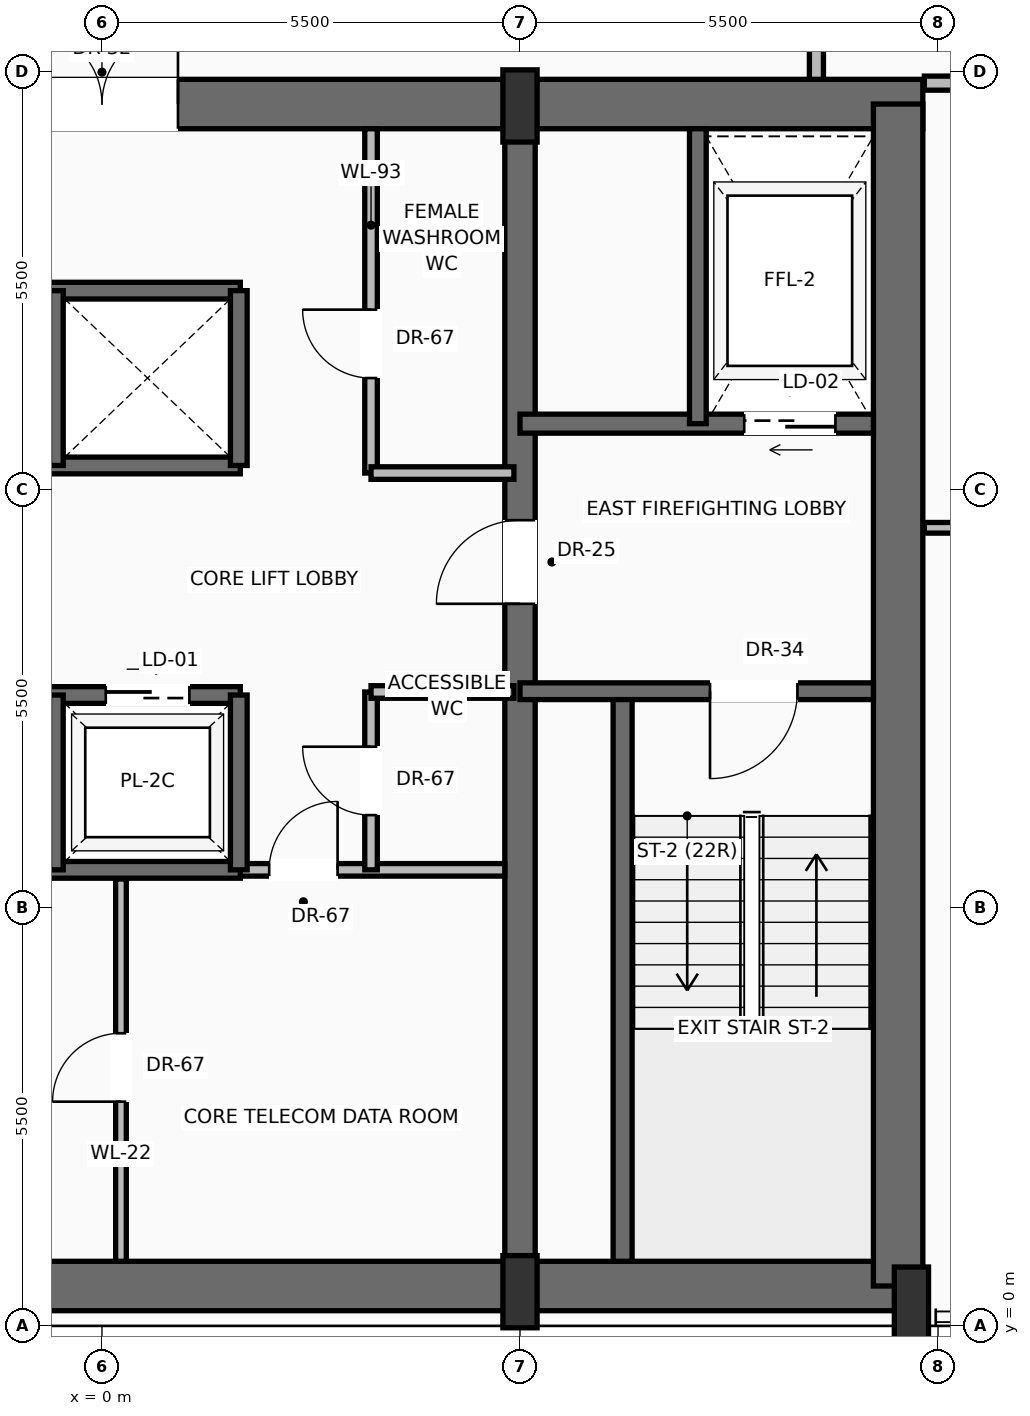
"""IFC4 building model, lengths in metres.
Left out: names, types, materials, properties, quantities, classifications, styles, units other than length and angle.
Written with IfcOpenShell. Run it as: python <this file> out.ifc"""

import sys

from ifc_helpers import new_model, si_unit, direction, frame, frame_2d, origin, origin_2d, place, context, subcontext, project, spatial, rectangle, extrude, source, transform, mapped, element, fill, save


model = new_model("IFC4")
c1 = context("Model", 3, precision=1e-05, world=origin(), true_north=direction((0.0, 1.0)))
c2 = subcontext(c1, "Body", "Model", "MODEL_VIEW")
j1 = project(units=[si_unit("LENGTHUNIT", "METRE"), si_unit("PLANEANGLEUNIT", "RADIAN")], contexts=[c1])
p1 = place(None, origin())
s1 = spatial("IfcSite", under=j1, at=p1, CompositionType="ELEMENT")
p2 = place(p1, origin())
s2 = spatial("IfcBuilding", under=s1, at=p2, CompositionType="ELEMENT")
p3 = place(p2, frame((0.0, 0.0, 155.2)))
s3 = spatial("IfcBuildingStorey", under=s2, at=p3, CompositionType="ELEMENT", Elevation=155.2)
p4 = place(p3, frame((-10.65, 0.525, 0.0), z_axis=(0.0, 0.0, 1.0), x_axis=(1.0, 0.0, 0.0)))
e1 = element("IfcWall", 1, at=p4, inside=s3, PredefinedType="SHEAR", context=c2, shape_type="SweptSolid", body=[
    extrude(rectangle(XDim=21.3, YDim=0.65, at=frame_2d((10.65, 0.0))), origin(), (0.0, 0.0, 1.0), 3.47),
])
p5 = place(p3, frame((-10.8, 16.075, 0.0), z_axis=(0.0, 0.0, 1.0), x_axis=(1.0, 0.0, 0.0)))
e2 = element("IfcWall", 2, at=p5, inside=s3, PredefinedType="SHEAR", context=c2, shape_type="SweptSolid", body=[
    extrude(rectangle(XDim=21.6, YDim=0.65, at=frame_2d((10.8, 0.0))), origin(), (0.0, 0.0, 1.0), 3.47),
])
p6 = place(p5, frame((3.37, 0.0, 0.0)))
e3 = element("IfcOpeningElement", 3, at=p6, cuts=e2, PredefinedType="OPENING", context=c2, shape_type="SweptSolid", body=[
    extrude(rectangle(XDim=1.3, YDim=2.3, at=frame_2d((0.65, 1.15))), frame((0.0, 0.335, 0.0), z_axis=(0.0, -1.0, 0.0), x_axis=(1.0, 0.0, 0.0)), (0.0, 0.0, 1.0), 0.67),
])
p7 = place(p5, frame((9.8, 0.0, 0.0)))
e4 = element("IfcOpeningElement", 4, at=p7, cuts=e2, PredefinedType="OPENING", context=c2, shape_type="SweptSolid", body=[
    extrude(rectangle(XDim=2.0, YDim=2.4, at=frame_2d((1.0, 1.2))), frame((0.0, 0.335, 0.0), z_axis=(0.0, -1.0, 0.0), x_axis=(1.0, 0.0, 0.0)), (0.0, 0.0, 1.0), 0.67),
])
p8 = place(p3, frame((10.475, 0.525, 0.0), z_axis=(0.0, 0.0, 1.0), x_axis=(0.0, 1.0, 0.0)))
e5 = element("IfcWall", 5, at=p8, inside=s3, PredefinedType="SHEAR", context=c2, shape_type="SweptSolid", body=[
    extrude(rectangle(XDim=15.55, YDim=0.65, at=frame_2d((7.775, 0.0))), origin(), (0.0, 0.0, 1.0), 3.47),
])
p9 = place(p3, frame((5.5, 0.525, 0.0), z_axis=(0.0, 0.0, 1.0), x_axis=(0.0, 1.0, 0.0)))
e6 = element("IfcWall", 6, at=p9, inside=s3, PredefinedType="SHEAR", context=c2, shape_type="SweptSolid", body=[
    extrude(rectangle(XDim=15.55, YDim=0.4, at=frame_2d((7.775, 0.0))), origin(), (0.0, 0.0, 1.0), 3.47),
])
p10 = place(p9, frame((8.975, 0.0, 0.0)))
e7 = element("IfcOpeningElement", 7, at=p10, cuts=e6, PredefinedType="OPENING", context=c2, shape_type="SweptSolid", body=[
    extrude(rectangle(XDim=1.1, YDim=2.2, at=frame_2d((0.55, 1.1))), frame((0.0, 0.21, 0.0), z_axis=(0.0, -1.0, 0.0), x_axis=(1.0, 0.0, 0.0)), (0.0, 0.0, 1.0), 0.42),
])
m1 = source(origin(), c2, "Body", "SweptSolid", [
    extrude(rectangle(XDim=0.45, YDim=0.95, at=origin_2d()), origin(), (0.0, 0.0, 1.0), 3.7),
])
for number, where, z_axis, x_axis in (
    (8, (5.5, 0.45, 0.0), (0.0, 0.0, 1.0), (1.0, 0.0, 0.0)),
    (9, (10.65, 0.3, 0.0), (0.0, 0.0, 1.0), (1.0, 0.0, 0.0)),
    (10, (5.5, 16.05, 0.0), (0.0, 0.0, 1.0), (1.0, 0.0, 0.0)),
):
    element("IfcColumn", number, at=place(p3, frame(where, z_axis=z_axis, x_axis=x_axis)), inside=s3, PredefinedType="PILASTER", context=c2, shape_type="MappedRepresentation", body=[
        mapped(m1, transform((0.0, 0.0, 0.0), scale=1.0)),
    ])
p11 = place(p3, frame((6.85, 0.85, 0.0), z_axis=(0.0, 0.0, 1.0), x_axis=(0.0, 1.0, 0.0)))
e11 = element("IfcWall", 11, at=p11, inside=s3, PredefinedType="SOLIDWALL", context=c2, shape_type="SweptSolid", body=[
    extrude(rectangle(XDim=7.5, YDim=0.25, at=frame_2d((3.75, 0.0))), origin(), (0.0, 0.0, 1.0), 3.47),
])
p12 = place(p3, frame((10.15, 8.35, 0.0), z_axis=(0.0, 0.0, 1.0), x_axis=(-1.0, 0.0, 0.0)))
e12 = element("IfcWall", 12, at=p12, inside=s3, PredefinedType="SOLIDWALL", context=c2, shape_type="SweptSolid", body=[
    extrude(rectangle(XDim=4.65, YDim=0.22, at=frame_2d((2.325, 0.0))), origin(), (0.0, 0.0, 1.0), 3.47),
])
p13 = place(p12, frame((1.0, 0.0, 0.0)))
e13 = element("IfcOpeningElement", 13, at=p13, cuts=e12, PredefinedType="OPENING", context=c2, shape_type="SweptSolid", body=[
    extrude(rectangle(XDim=1.15, YDim=2.2, at=frame_2d((0.575, 1.1))), frame((0.0, 0.12, 0.0), z_axis=(0.0, -1.0, 0.0), x_axis=(1.0, 0.0, 0.0)), (0.0, 0.0, 1.0), 0.24),
])
p14 = place(p3, frame((10.15, 11.87, 0.0), z_axis=(0.0, 0.0, 1.0), x_axis=(-1.0, 0.0, 0.0)))
e14 = element("IfcWall", 14, at=p14, inside=s3, PredefinedType="SOLIDWALL", context=c2, shape_type="SweptSolid", body=[
    extrude(rectangle(XDim=4.65, YDim=0.25, at=frame_2d((2.325, 0.0))), origin(), (0.0, 0.0, 1.0), 3.47),
])
p15 = place(p14, frame((0.5, 0.0, 0.0)))
e15 = element("IfcOpeningElement", 15, at=p15, cuts=e14, PredefinedType="OPENING", context=c2, shape_type="SweptSolid", body=[
    extrude(rectangle(XDim=1.2, YDim=2.25, at=frame_2d((0.6, 1.125))), frame((0.0, 0.135, 0.0), z_axis=(0.0, -1.0, 0.0), x_axis=(1.0, 0.0, 0.0)), (0.0, 0.0, 1.0), 0.27),
])
p16 = place(p3, frame((7.84, 11.87, 0.0), z_axis=(0.0, 0.0, 1.0), x_axis=(0.0, 1.0, 0.0)))
e16 = element("IfcWall", 16, at=p16, inside=s3, PredefinedType="SOLIDWALL", context=c2, shape_type="SweptSolid", body=[
    extrude(rectangle(XDim=3.88, YDim=0.22, at=frame_2d((1.94, 0.0))), origin(), (0.0, 0.0, 1.0), 3.47),
])
p17 = place(p3, frame((1.82, 6.0, 0.0), z_axis=(0.0, 0.0, 1.0), x_axis=(1.0, 0.0, 0.0)))
e17 = element("IfcWall", 17, at=p17, inside=s3, PredefinedType="PARTITIONING", context=c2, shape_type="SweptSolid", body=[
    extrude(rectangle(XDim=3.48, YDim=0.165, at=frame_2d((1.74, 0.0))), origin(), (0.0, 0.0, 1.0), 3.462),
])
p18 = place(p17, frame((0.38, 0.0, 0.0)))
e18 = element("IfcOpeningElement", 18, at=p18, cuts=e17, PredefinedType="OPENING", context=c2, shape_type="SweptSolid", body=[
    extrude(rectangle(XDim=0.9, YDim=2.1, at=frame_2d((0.45, 1.05))), frame((0.0, 0.093, 0.0), z_axis=(0.0, -1.0, 0.0), x_axis=(1.0, 0.0, 0.0)), (0.0, 0.0, 1.0), 0.185),
])
p19 = place(p3, frame((0.25, 0.85, 0.0), z_axis=(0.0, 0.0, 1.0), x_axis=(0.0, 1.0, 0.0)))
e19 = element("IfcWall", 19, at=p19, inside=s3, PredefinedType="PARTITIONING", context=c2, shape_type="SweptSolid", body=[
    extrude(rectangle(XDim=5.03, YDim=0.14, at=frame_2d((2.515, 0.0))), origin(), (0.0, 0.0, 1.0), 3.462),
])
p20 = place(p19, frame((2.1, 0.0, 0.0)))
e20 = element("IfcOpeningElement", 20, at=p20, cuts=e19, PredefinedType="OPENING", context=c2, shape_type="SweptSolid", body=[
    extrude(rectangle(XDim=0.9, YDim=2.1, at=frame_2d((0.45, 1.05))), frame((0.0, 0.08, 0.0), z_axis=(0.0, -1.0, 0.0), x_axis=(1.0, 0.0, 0.0)), (0.0, 0.0, 1.0), 0.16),
])
p21 = place(p3, frame((3.54, 6.0, 0.0), z_axis=(0.0, 0.0, 1.0), x_axis=(0.0, 1.0, 0.0)))
e21 = element("IfcWall", 21, at=p21, inside=s3, PredefinedType="PARTITIONING", context=c2, shape_type="SweptSolid", body=[
    extrude(rectangle(XDim=2.34, YDim=0.165, at=frame_2d((1.17, 0.0))), origin(), (0.0, 0.0, 1.0), 3.462),
])
p22 = place(p21, frame((0.72, 0.0, 0.0)))
e22 = element("IfcOpeningElement", 22, at=p22, cuts=e21, PredefinedType="OPENING", context=c2, shape_type="SweptSolid", body=[
    extrude(rectangle(XDim=0.9, YDim=2.1, at=frame_2d((0.45, 1.05))), frame((0.0, 0.093, 0.0), z_axis=(0.0, -1.0, 0.0), x_axis=(1.0, 0.0, 0.0)), (0.0, 0.0, 1.0), 0.185),
])
p23 = place(p3, frame((3.54, 8.34, 0.0), z_axis=(0.0, 0.0, 1.0), x_axis=(1.0, 0.0, 0.0)))
e23 = element("IfcWall", 23, at=p23, inside=s3, PredefinedType="PARTITIONING", context=c2, shape_type="SweptSolid", body=[
    extrude(rectangle(XDim=1.88, YDim=0.165, at=frame_2d((0.94, 0.0))), origin(), (0.0, 0.0, 1.0), 3.462),
])
p24 = place(p3, frame((-5.5, 6.0, 0.0), z_axis=(0.0, 0.0, 1.0), x_axis=(1.0, 0.0, 0.0)))
e24 = element("IfcWall", 24, at=p24, inside=s3, PredefinedType="SOLIDWALL", context=c2, shape_type="SweptSolid", body=[
    extrude(rectangle(XDim=7.32, YDim=0.22, at=frame_2d((3.66, 0.0))), origin(), (0.0, 0.0, 1.0), 3.47),
])
p25 = place(p3, frame((-5.5, 8.3, 0.0), z_axis=(0.0, 0.0, 1.0), x_axis=(1.0, 0.0, 0.0)))
e25 = element("IfcWall", 25, at=p25, inside=s3, PredefinedType="SOLIDWALL", context=c2, shape_type="SweptSolid", body=[
    extrude(rectangle(XDim=7.32, YDim=0.22, at=frame_2d((3.66, 0.0))), origin(), (0.0, 0.0, 1.0), 3.47),
])
p26 = place(p25, frame((0.75, 0.0, 0.0)))
e26 = element("IfcOpeningElement", 26, at=p26, cuts=e25, PredefinedType="OPENING", context=c2, shape_type="SweptSolid", body=[
    extrude(rectangle(XDim=1.1, YDim=2.2, at=frame_2d((0.55, 1.1))), frame((0.0, 0.12, 0.0), z_axis=(0.0, -1.0, 0.0), x_axis=(1.0, 0.0, 0.0)), (0.0, 0.0, 1.0), 0.24),
])
p27 = place(p25, frame((3.15, 0.0, 0.0)))
e27 = element("IfcOpeningElement", 27, at=p27, cuts=e25, PredefinedType="OPENING", context=c2, shape_type="SweptSolid", body=[
    extrude(rectangle(XDim=1.1, YDim=2.2, at=frame_2d((0.55, 1.1))), frame((0.0, 0.12, 0.0), z_axis=(0.0, -1.0, 0.0), x_axis=(1.0, 0.0, 0.0)), (0.0, 0.0, 1.0), 0.24),
])
p28 = place(p25, frame((5.55, 0.0, 0.0)))
e28 = element("IfcOpeningElement", 28, at=p28, cuts=e25, PredefinedType="OPENING", context=c2, shape_type="SweptSolid", body=[
    extrude(rectangle(XDim=1.1, YDim=2.2, at=frame_2d((0.55, 1.1))), frame((0.0, 0.12, 0.0), z_axis=(0.0, -1.0, 0.0), x_axis=(1.0, 0.0, 0.0)), (0.0, 0.0, 1.0), 0.24),
])
p29 = place(p3, frame((1.8, 6.0, 0.0), z_axis=(0.0, 0.0, 1.0), x_axis=(0.0, 1.0, 0.0)))
e29 = element("IfcWall", 29, at=p29, inside=s3, PredefinedType="SOLIDWALL", context=c2, shape_type="SweptSolid", body=[
    extrude(rectangle(XDim=2.3, YDim=0.22, at=frame_2d((1.15, 0.0))), origin(), (0.0, 0.0, 1.0), 3.47),
])
p30 = place(p3, frame((-0.6, 6.0, 0.0), z_axis=(0.0, 0.0, 1.0), x_axis=(0.0, 1.0, 0.0)))
e30 = element("IfcWall", 30, at=p30, inside=s3, PredefinedType="SOLIDWALL", context=c2, shape_type="SweptSolid", body=[
    extrude(rectangle(XDim=2.3, YDim=0.18, at=frame_2d((1.15, 0.0))), origin(), (0.0, 0.0, 1.0), 3.47),
])
for number, where, z_axis, x_axis in (
    (31, (-5.5, 11.32, 0.0), (0.0, 0.0, 1.0), (1.0, 0.0, 0.0)),
    (32, (-5.5, 13.62, 0.0), (0.0, 0.0, 1.0), (1.0, 0.0, 0.0)),
):
    element("IfcWall", number, at=place(p3, frame(where, z_axis=z_axis, x_axis=x_axis)), inside=s3, PredefinedType="SOLIDWALL", context=c2, shape_type="SweptSolid", body=[
        extrude(rectangle(XDim=7.32, YDim=0.22, at=frame_2d((3.66, 0.0))), origin(), (0.0, 0.0, 1.0), 3.47),
    ])
p31 = place(p3, frame((1.8, 11.32, 0.0), z_axis=(0.0, 0.0, 1.0), x_axis=(0.0, 1.0, 0.0)))
e33 = element("IfcWall", 33, at=p31, inside=s3, PredefinedType="SOLIDWALL", context=c2, shape_type="SweptSolid", body=[
    extrude(rectangle(XDim=2.3, YDim=0.22, at=frame_2d((1.15, 0.0))), origin(), (0.0, 0.0, 1.0), 3.47),
])
p32 = place(p3, frame((-0.6, 11.32, 0.0), z_axis=(0.0, 0.0, 1.0), x_axis=(0.0, 1.0, 0.0)))
e34 = element("IfcWall", 34, at=p32, inside=s3, PredefinedType="SOLIDWALL", context=c2, shape_type="SweptSolid", body=[
    extrude(rectangle(XDim=2.3, YDim=0.18, at=frame_2d((1.15, 0.0))), origin(), (0.0, 0.0, 1.0), 3.47),
])
p33 = place(p3, frame((3.54, 11.22, 0.0), z_axis=(0.0, 0.0, 1.0), x_axis=(0.0, 1.0, 0.0)))
e35 = element("IfcWall", 35, at=p33, inside=s3, PredefinedType="PARTITIONING", context=c2, shape_type="SweptSolid", body=[
    extrude(rectangle(XDim=4.53, YDim=0.165, at=frame_2d((2.265, 0.0))), origin(), (0.0, 0.0, 1.0), 3.462),
])
p34 = place(p33, frame((1.25, 0.0, 0.0)))
e36 = element("IfcOpeningElement", 36, at=p34, cuts=e35, PredefinedType="OPENING", context=c2, shape_type="SweptSolid", body=[
    extrude(rectangle(XDim=0.9, YDim=2.1, at=frame_2d((0.45, 1.05))), frame((0.0, 0.093, 0.0), z_axis=(0.0, -1.0, 0.0), x_axis=(1.0, 0.0, 0.0)), (0.0, 0.0, 1.0), 0.185),
])
p35 = place(p3, frame((3.54, 11.22, 0.0), z_axis=(0.0, 0.0, 1.0), x_axis=(1.0, 0.0, 0.0)))
e37 = element("IfcWall", 37, at=p35, inside=s3, PredefinedType="PARTITIONING", context=c2, shape_type="SweptSolid", body=[
    extrude(rectangle(XDim=1.88, YDim=0.165, at=frame_2d((0.94, 0.0))), origin(), (0.0, 0.0, 1.0), 3.462),
])
p36 = place(p3, frame((9.4, 16.4, 0.0), z_axis=(0.0, 0.0, 1.0), x_axis=(0.0, 1.0, 0.0)))
e38 = element("IfcWall", 38, at=p36, inside=s3, PredefinedType="PARTITIONING", context=c2, shape_type="SweptSolid", body=[
    extrude(rectangle(XDim=8.8, YDim=0.185, at=frame_2d((4.4, 0.0))), origin(), (0.0, 0.0, 1.0), 2.846),
])
p37 = place(p36, frame((4.331, 0.0, 0.0)))
e39 = element("IfcOpeningElement", 39, at=p37, cuts=e38, PredefinedType="OPENING", context=c2, shape_type="SweptSolid", body=[
    extrude(rectangle(XDim=0.95, YDim=2.2, at=frame_2d((0.475, 1.1))), frame((0.0, 0.103, 0.0), z_axis=(0.0, -1.0, 0.0), x_axis=(1.0, 0.0, 0.0)), (0.0, 0.0, 1.0), 0.205),
])
p38 = place(p3, frame((10.82, 16.35, 0.0), z_axis=(0.0, 0.0, 1.0), x_axis=(1.0, 0.0, 0.0)))
e40 = element("IfcWall", 40, at=p38, inside=s3, PredefinedType="PARTITIONING", context=c2, shape_type="SweptSolid", body=[
    extrude(rectangle(XDim=10.549, YDim=0.185, at=frame_2d((5.274, 0.0))), origin(), (0.0, 0.0, 1.0), 3.462),
])
p39 = place(p38, frame((3.319, 0.0, 0.0)))
e41 = element("IfcOpeningElement", 41, at=p39, cuts=e40, PredefinedType="OPENING", context=c2, shape_type="SweptSolid", body=[
    extrude(rectangle(XDim=0.95, YDim=2.2, at=frame_2d((0.475, 1.1))), frame((0.0, 0.103, 0.0), z_axis=(0.0, -1.0, 0.0), x_axis=(1.0, 0.0, 0.0)), (0.0, 0.0, 1.0), 0.205),
])
p40 = place(p3, frame((10.82, 10.5, 0.0), z_axis=(0.0, 0.0, 1.0), x_axis=(1.0, 0.0, 0.0)))
e42 = element("IfcWall", 42, at=p40, inside=s3, PredefinedType="PARTITIONING", context=c2, shape_type="SweptSolid", body=[
    extrude(rectangle(XDim=14.269, YDim=0.14, at=frame_2d((7.135, 0.0))), origin(), (0.0, 0.0, 1.0), 3.462),
])
p41 = place(p40, frame((6.652, 0.0, 0.0)))
e43 = element("IfcOpeningElement", 43, at=p41, cuts=e42, PredefinedType="OPENING", context=c2, shape_type="SweptSolid", body=[
    extrude(rectangle(XDim=0.95, YDim=2.2, at=frame_2d((0.475, 1.1))), frame((0.0, 0.08, 0.0), z_axis=(0.0, -1.0, 0.0), x_axis=(1.0, 0.0, 0.0)), (0.0, 0.0, 1.0), 0.16),
])
m2 = source(origin(), c2, "Body", "SweptSolid", [
    extrude(rectangle(XDim=1.15, YDim=2.2, at=frame_2d((0.575, 1.1))), frame((0.0, 0.025, 0.0), z_axis=(0.0, -1.0, 0.0), x_axis=(1.0, 0.0, 0.0)), (0.0, 0.0, 1.0), 0.05),
])
p42 = place(p13, origin())
e44 = element("IfcDoor", 44, at=p42, inside=s3, OperationType="SINGLE_SWING_RIGHT", PredefinedType="DOOR", context=c2, shape_type="MappedRepresentation", body=[
    mapped(m2, transform((0.0, 0.0, 0.0), scale=1.0)),
])
fill(e13, e44)
m3 = source(origin(), c2, "Body", "SweptSolid", [
    extrude(rectangle(XDim=1.1, YDim=2.2, at=frame_2d((0.55, 1.1))), frame((0.0, 0.025, 0.0), z_axis=(0.0, -1.0, 0.0), x_axis=(1.0, 0.0, 0.0)), (0.0, 0.0, 1.0), 0.05),
])
p43 = place(p10, origin())
e45 = element("IfcDoor", 45, at=p43, inside=s3, OperationType="SINGLE_SWING_LEFT", PredefinedType="DOOR", context=c2, shape_type="MappedRepresentation", body=[
    mapped(m3, transform((0.0, 0.0, 0.0), scale=1.0)),
])
fill(e7, e45)
m4 = source(origin(), c2, "Body", "SweptSolid", [
    extrude(rectangle(XDim=1.2, YDim=2.25, at=frame_2d((0.6, 1.125))), frame((0.0, 0.025, 0.0), z_axis=(0.0, -1.0, 0.0), x_axis=(1.0, 0.0, 0.0)), (0.0, 0.0, 1.0), 0.05),
])
p44 = place(p15, origin())
e46 = element("IfcDoor", 46, at=p44, inside=s3, OperationType="SLIDING_TO_RIGHT", PredefinedType="DOOR", context=c2, shape_type="MappedRepresentation", body=[
    mapped(m4, transform((0.0, 0.0, 0.0), scale=1.0)),
])
fill(e15, e46)
m5 = source(origin(), c2, "Body", "SweptSolid", [
    extrude(rectangle(XDim=2.0, YDim=2.4, at=frame_2d((1.0, 1.2))), frame((0.0, 0.025, 0.0), z_axis=(0.0, -1.0, 0.0), x_axis=(1.0, 0.0, 0.0)), (0.0, 0.0, 1.0), 0.05),
])
p45 = place(p7, origin())
e47 = element("IfcDoor", 47, at=p45, inside=s3, OperationType="DOUBLE_DOOR_SINGLE_SWING", PredefinedType="DOOR", context=c2, shape_type="MappedRepresentation", body=[
    mapped(m5, transform((0.0, 0.0, 0.0), scale=1.0)),
])
fill(e4, e47)
m6 = source(origin(), c2, "Body", "SweptSolid", [
    extrude(rectangle(XDim=0.9, YDim=2.1, at=frame_2d((0.45, 1.05))), frame((0.0, 0.025, 0.0), z_axis=(0.0, -1.0, 0.0), x_axis=(1.0, 0.0, 0.0)), (0.0, 0.0, 1.0), 0.05),
])
p46 = place(p18, origin())
e48 = element("IfcDoor", 48, at=p46, inside=s3, OperationType="SINGLE_SWING_RIGHT", PredefinedType="DOOR", context=c2, shape_type="MappedRepresentation", body=[
    mapped(m6, transform((0.0, 0.0, 0.0), scale=1.0)),
])
fill(e18, e48)
p47 = place(p20, origin())
e49 = element("IfcDoor", 49, at=p47, inside=s3, OperationType="SINGLE_SWING_LEFT", PredefinedType="DOOR", context=c2, shape_type="MappedRepresentation", body=[
    mapped(m6, transform((0.0, 0.0, 0.0), scale=1.0)),
])
fill(e20, e49)
p48 = place(p22, origin())
e50 = element("IfcDoor", 50, at=p48, inside=s3, OperationType="SINGLE_SWING_RIGHT", PredefinedType="DOOR", context=c2, shape_type="MappedRepresentation", body=[
    mapped(m6, transform((0.0, 0.0, 0.0), scale=1.0)),
])
fill(e22, e50)
m7 = source(origin(), c2, "Body", "SweptSolid", [
    extrude(rectangle(XDim=1.1, YDim=2.2, at=frame_2d((0.55, 1.1))), frame((0.0, 0.025, 0.0), z_axis=(0.0, -1.0, 0.0), x_axis=(1.0, 0.0, 0.0)), (0.0, 0.0, 1.0), 0.05),
])
p49 = place(p28, origin())
e51 = element("IfcDoor", 51, at=p49, inside=s3, OperationType="SLIDING_TO_LEFT", PredefinedType="DOOR", context=c2, shape_type="MappedRepresentation", body=[
    mapped(m7, transform((0.0, 0.0, 0.0), scale=1.0)),
])
fill(e28, e51)
p50 = place(p34, origin())
e52 = element("IfcDoor", 52, at=p50, inside=s3, OperationType="SINGLE_SWING_RIGHT", PredefinedType="DOOR", context=c2, shape_type="MappedRepresentation", body=[
    mapped(m6, transform((0.0, 0.0, 0.0), scale=1.0)),
])
fill(e36, e52)
save(model, sys.argv[1])
